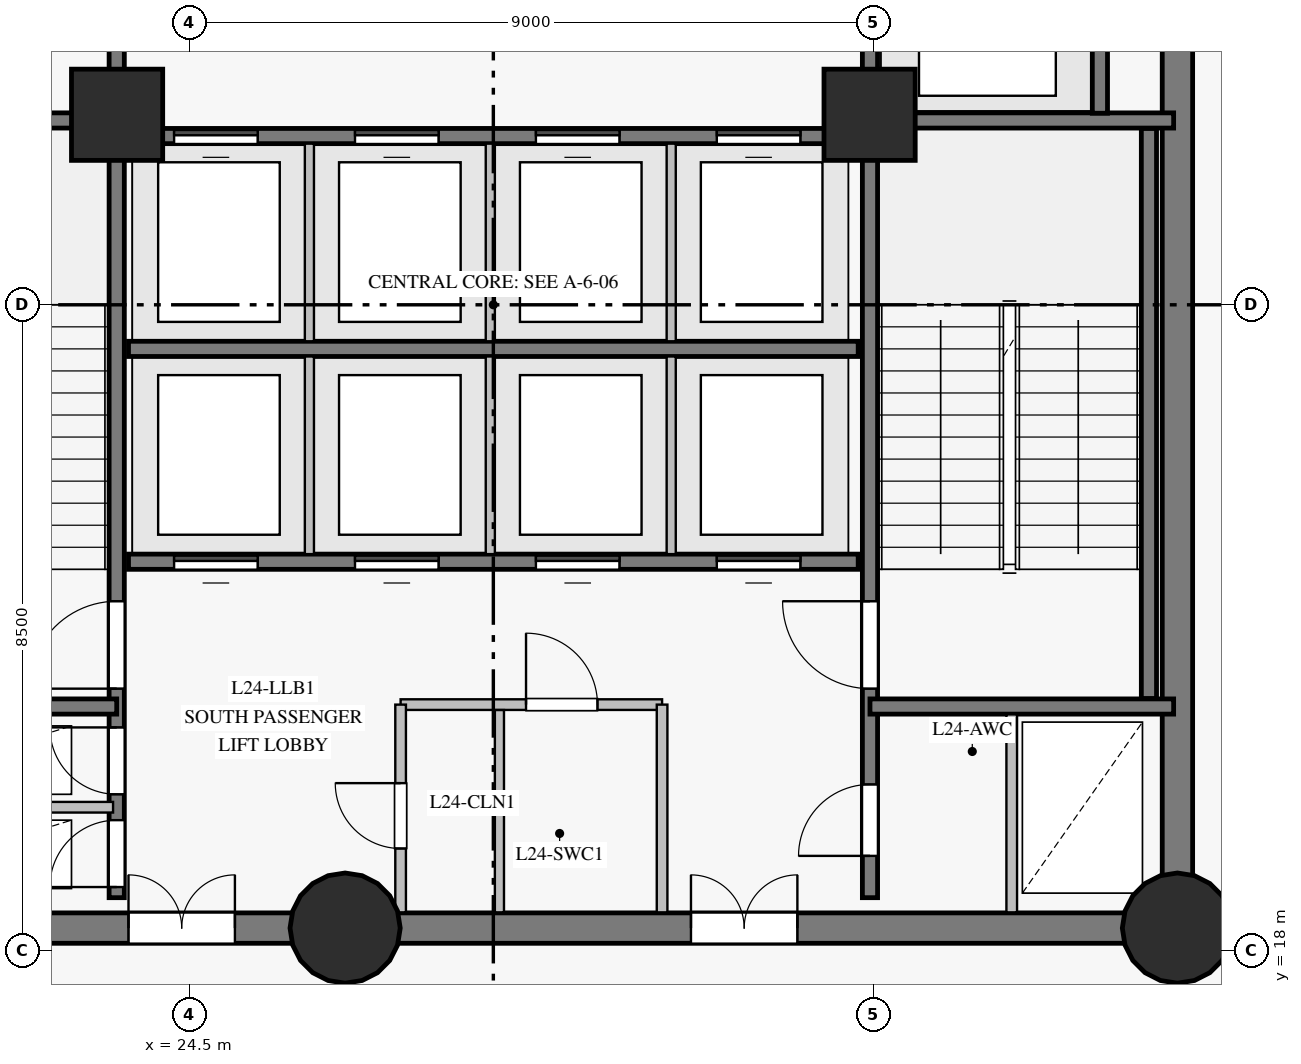
"""IFC4 building model, lengths in metres.
Left out: names, types, materials, properties, quantities, classifications, styles, units other than length and angle.
Written with IfcOpenShell. Run it as: python <this file> out.ifc"""

import sys

from ifc_helpers import new_model, si_unit, direction, frame, frame_2d, origin, origin_with_axes, origin_2d, place, context, subcontext, project, spatial, rectangle, circle, extrude, source, transform, mapped, element, fill, save


model = new_model("IFC4")
c1 = context("Model", 3, precision=1e-05, world=origin(), true_north=direction((0.0, 1.0)))
c2 = subcontext(c1, "Body", "Model", "MODEL_VIEW")
j1 = project(units=[si_unit("LENGTHUNIT", "METRE"), si_unit("PLANEANGLEUNIT", "RADIAN")], contexts=[c1])
p1 = place(None, origin())
s1 = spatial("IfcSite", under=j1, at=p1, CompositionType="ELEMENT")
p2 = place(p1, origin())
s2 = spatial("IfcBuilding", under=s1, at=p2, CompositionType="ELEMENT")
p3 = place(p2, frame((0.0, 0.0, 92.2)))
s3 = spatial("IfcBuildingStorey", under=s2, at=p3, CompositionType="ELEMENT", Elevation=92.2)
p4 = place(p3, frame((19.5, 18.3, 0.0), z_axis=(0.0, 0.0, 1.0), x_axis=(1.0, 0.0, 0.0)))
e1 = element("IfcWall", 1, at=p4, inside=s3, PredefinedType="SHEAR", context=c2, shape_type="SweptSolid", body=[
    extrude(rectangle(XDim=7.05, YDim=0.4, at=frame_2d((3.525, 0.0))), origin(), (0.0, 0.0, 1.0), 3.775),
])
p5 = place(p4, frame((4.2, 0.0, 0.0)))
e2 = element("IfcOpeningElement", 2, at=p5, cuts=e1, PredefinedType="OPENING", context=c2, shape_type="SweptSolid", body=[
    extrude(rectangle(XDim=1.4, YDim=2.2, at=frame_2d((0.7, 1.1))), frame((0.0, 0.21, 0.0), z_axis=(0.0, -1.0, 0.0), x_axis=(1.0, 0.0, 0.0)), (0.0, 0.0, 1.0), 0.42),
])
p6 = place(p3, frame((26.55, 18.3, 0.0), z_axis=(0.0, 0.0, 1.0), x_axis=(1.0, 0.0, 0.0)))
e3 = element("IfcWall", 3, at=p6, inside=s3, PredefinedType="SHEAR", context=c2, shape_type="SweptSolid", body=[
    extrude(rectangle(XDim=10.95, YDim=0.4, at=frame_2d((5.475, 0.0))), origin(), (0.0, 0.0, 1.0), 3.775),
])
p7 = place(p6, frame((4.55, 0.0, 0.0)))
e4 = element("IfcOpeningElement", 4, at=p7, cuts=e3, PredefinedType="OPENING", context=c2, shape_type="SweptSolid", body=[
    extrude(rectangle(XDim=1.4, YDim=2.2, at=frame_2d((0.7, 1.1))), frame((0.0, 0.21, 0.0), z_axis=(0.0, -1.0, 0.0), x_axis=(1.0, 0.0, 0.0)), (0.0, 0.0, 1.0), 0.42),
])
p8 = place(p3, frame((37.5, 18.3, 0.0), z_axis=(0.0, 0.0, 1.0), x_axis=(0.0, 1.0, 0.0)))
e5 = element("IfcWall", 5, at=p8, inside=s3, PredefinedType="SHEAR", context=c2, shape_type="SweptSolid", body=[
    extrude(rectangle(XDim=16.4, YDim=0.4, at=frame_2d((8.2, 0.0))), origin(), (0.0, 0.0, 1.0), 3.775),
])
p9 = place(p8, frame((14.15, 0.0, 0.0)))
e6 = element("IfcOpeningElement", 6, at=p9, cuts=e5, PredefinedType="OPENING", context=c2, shape_type="SweptSolid", body=[
    extrude(rectangle(XDim=1.2, YDim=2.15, at=frame_2d((0.6, 1.075))), frame((0.0, 0.21, 0.0), z_axis=(0.0, -1.0, 0.0), x_axis=(1.0, 0.0, 0.0)), (0.0, 0.0, 1.0), 0.42),
])
m1 = source(origin_with_axes(), c2, "Body", "SweptSolid", [
    extrude(circle(Radius=0.725, at=origin_2d()), origin(), (0.0, 0.0, 1.0), 4.0),
])
for number, where, z_axis, x_axis in (
    (7, (26.55, 18.3, 0.0), (0.0, 0.0, 1.0), (1.0, 0.0, 0.0)),
    (8, (37.5, 18.3, 0.0), (0.0, 0.0, 1.0), (1.0, 0.0, 0.0)),
):
    element("IfcColumn", number, at=place(p3, frame(where, z_axis=z_axis, x_axis=x_axis)), inside=s3, PredefinedType="COLUMN", context=c2, shape_type="MappedRepresentation", body=[
        mapped(m1, transform((0.0, 0.0, 0.0), scale=1.0)),
    ])
m2 = source(origin_with_axes(), c2, "Body", "SweptSolid", [
    extrude(rectangle(XDim=1.2, YDim=1.2, at=origin_2d()), origin(), (0.0, 0.0, 1.0), 4.0),
])
for number, where, z_axis, x_axis in (
    (9, (23.55, 29.0, 0.0), (0.0, 0.0, 1.0), (1.0, 0.0, 0.0)),
    (10, (33.45, 29.0, 0.0), (0.0, 0.0, 1.0), (1.0, 0.0, 0.0)),
):
    element("IfcColumn", number, at=place(p3, frame(where, z_axis=z_axis, x_axis=x_axis)), inside=s3, PredefinedType="COLUMN", context=c2, shape_type="MappedRepresentation", body=[
        mapped(m2, transform((0.0, 0.0, 0.0), scale=1.0)),
    ])
p10 = place(p3, frame((23.545, 18.7, 0.0), z_axis=(0.0, 0.0, 1.0), x_axis=(0.0, 1.0, 0.0)))
e11 = element("IfcWall", 11, at=p10, inside=s3, PredefinedType="SHEAR", context=c2, shape_type="SweptSolid", body=[
    extrude(rectangle(XDim=15.6, YDim=0.2, at=frame_2d((7.8, 0.0))), origin(), (0.0, 0.0, 1.0), 3.775),
])
p11 = place(p10, frame((2.75, 0.0, 0.0)))
e12 = element("IfcOpeningElement", 12, at=p11, cuts=e11, PredefinedType="OPENING", context=c2, shape_type="SweptSolid", body=[
    extrude(rectangle(XDim=1.15, YDim=2.15, at=frame_2d((0.575, 1.075))), frame((0.0, 0.11, 0.0), z_axis=(0.0, -1.0, 0.0), x_axis=(1.0, 0.0, 0.0)), (0.0, 0.0, 1.0), 0.22),
])
p12 = place(p10, frame((0.14, 0.0, 0.0)))
e13 = element("IfcOpeningElement", 13, at=p12, cuts=e11, PredefinedType="OPENING", context=c2, shape_type="SweptSolid", body=[
    extrude(rectangle(XDim=0.88, YDim=2.1, at=frame_2d((0.44, 1.05))), frame((0.0, 0.11, 0.0), z_axis=(0.0, -1.0, 0.0), x_axis=(1.0, 0.0, 0.0)), (0.0, 0.0, 1.0), 0.22),
])
p13 = place(p10, frame((1.36, 0.0, 0.0)))
e14 = element("IfcOpeningElement", 14, at=p13, cuts=e11, PredefinedType="OPENING", context=c2, shape_type="SweptSolid", body=[
    extrude(rectangle(XDim=0.88, YDim=2.1, at=frame_2d((0.44, 1.05))), frame((0.0, 0.11, 0.0), z_axis=(0.0, -1.0, 0.0), x_axis=(1.0, 0.0, 0.0)), (0.0, 0.0, 1.0), 0.22),
])
p14 = place(p10, frame((12.1, 0.0, 0.0)))
e15 = element("IfcOpeningElement", 15, at=p14, cuts=e11, PredefinedType="OPENING", context=c2, shape_type="SweptSolid", body=[
    extrude(rectangle(XDim=1.12, YDim=2.15, at=frame_2d((0.56, 1.075))), frame((0.0, 0.11, 0.0), z_axis=(0.0, -1.0, 0.0), x_axis=(1.0, 0.0, 0.0)), (0.0, 0.0, 1.0), 0.22),
])
p15 = place(p10, frame((14.05, 0.0, 0.0)))
e16 = element("IfcOpeningElement", 16, at=p15, cuts=e11, PredefinedType="OPENING", context=c2, shape_type="SweptSolid", body=[
    extrude(rectangle(XDim=1.12, YDim=2.15, at=frame_2d((0.56, 1.075))), frame((0.0, 0.11, 0.0), z_axis=(0.0, -1.0, 0.0), x_axis=(1.0, 0.0, 0.0)), (0.0, 0.0, 1.0), 0.22),
])
p16 = place(p3, frame((33.455, 18.7, 0.0), z_axis=(0.0, 0.0, 1.0), x_axis=(0.0, 1.0, 0.0)))
e17 = element("IfcWall", 17, at=p16, inside=s3, PredefinedType="SHEAR", context=c2, shape_type="SweptSolid", body=[
    extrude(rectangle(XDim=15.6, YDim=0.2, at=frame_2d((7.8, 0.0))), origin(), (0.0, 0.0, 1.0), 3.775),
])
p17 = place(p16, frame((2.75, 0.0, 0.0)))
e18 = element("IfcOpeningElement", 18, at=p17, cuts=e17, PredefinedType="OPENING", context=c2, shape_type="SweptSolid", body=[
    extrude(rectangle(XDim=1.15, YDim=2.15, at=frame_2d((0.575, 1.075))), frame((0.0, 0.11, 0.0), z_axis=(0.0, -1.0, 0.0), x_axis=(1.0, 0.0, 0.0)), (0.0, 0.0, 1.0), 0.22),
])
p18 = place(p16, frame((0.55, 0.0, 0.0)))
e19 = element("IfcOpeningElement", 19, at=p18, cuts=e17, PredefinedType="OPENING", context=c2, shape_type="SweptSolid", body=[
    extrude(rectangle(XDim=0.94, YDim=2.1, at=frame_2d((0.47, 1.05))), frame((0.0, 0.11, 0.0), z_axis=(0.0, -1.0, 0.0), x_axis=(1.0, 0.0, 0.0)), (0.0, 0.0, 1.0), 0.22),
])
p19 = place(p3, frame((23.7, 23.12, 0.0), z_axis=(0.0, 0.0, 1.0), x_axis=(1.0, 0.0, 0.0)))
e20 = element("IfcWall", 20, at=p19, inside=s3, PredefinedType="SHEAR", context=c2, shape_type="SweptSolid", body=[
    extrude(rectangle(XDim=9.6, YDim=0.2, at=frame_2d((4.8, 0.0))), origin(), (0.0, 0.0, 1.0), 3.775),
])
p20 = place(p19, frame((0.6, 0.0, 0.0)))
e21 = element("IfcOpeningElement", 21, at=p20, cuts=e20, PredefinedType="OPENING", context=c2, shape_type="SweptSolid", body=[
    extrude(rectangle(XDim=1.1, YDim=2.15, at=frame_2d((0.55, 1.075))), frame((0.0, 0.11, 0.0), z_axis=(0.0, -1.0, 0.0), x_axis=(1.0, 0.0, 0.0)), (0.0, 0.0, 1.0), 0.22),
])
p21 = place(p19, frame((2.98, 0.0, 0.0)))
e22 = element("IfcOpeningElement", 22, at=p21, cuts=e20, PredefinedType="OPENING", context=c2, shape_type="SweptSolid", body=[
    extrude(rectangle(XDim=1.1, YDim=2.15, at=frame_2d((0.55, 1.075))), frame((0.0, 0.11, 0.0), z_axis=(0.0, -1.0, 0.0), x_axis=(1.0, 0.0, 0.0)), (0.0, 0.0, 1.0), 0.22),
])
p22 = place(p19, frame((5.36, 0.0, 0.0)))
e23 = element("IfcOpeningElement", 23, at=p22, cuts=e20, PredefinedType="OPENING", context=c2, shape_type="SweptSolid", body=[
    extrude(rectangle(XDim=1.1, YDim=2.15, at=frame_2d((0.55, 1.075))), frame((0.0, 0.11, 0.0), z_axis=(0.0, -1.0, 0.0), x_axis=(1.0, 0.0, 0.0)), (0.0, 0.0, 1.0), 0.22),
])
p23 = place(p19, frame((7.74, 0.0, 0.0)))
e24 = element("IfcOpeningElement", 24, at=p23, cuts=e20, PredefinedType="OPENING", context=c2, shape_type="SweptSolid", body=[
    extrude(rectangle(XDim=1.1, YDim=2.15, at=frame_2d((0.55, 1.075))), frame((0.0, 0.11, 0.0), z_axis=(0.0, -1.0, 0.0), x_axis=(1.0, 0.0, 0.0)), (0.0, 0.0, 1.0), 0.22),
])
p24 = place(p3, frame((23.7, 25.92, 0.0), z_axis=(0.0, 0.0, 1.0), x_axis=(1.0, 0.0, 0.0)))
e25 = element("IfcWall", 25, at=p24, inside=s3, PredefinedType="SHEAR", context=c2, shape_type="SweptSolid", body=[
    extrude(rectangle(XDim=9.6, YDim=0.2, at=frame_2d((4.8, 0.0))), origin(), (0.0, 0.0, 1.0), 3.775),
])
p25 = place(p3, frame((23.7, 28.72, 0.0), z_axis=(0.0, 0.0, 1.0), x_axis=(1.0, 0.0, 0.0)))
e26 = element("IfcWall", 26, at=p25, inside=s3, PredefinedType="SHEAR", context=c2, shape_type="SweptSolid", body=[
    extrude(rectangle(XDim=9.6, YDim=0.2, at=frame_2d((4.8, 0.0))), origin(), (0.0, 0.0, 1.0), 3.775),
])
p26 = place(p25, frame((0.6, 0.0, 0.0)))
e27 = element("IfcOpeningElement", 27, at=p26, cuts=e26, PredefinedType="OPENING", context=c2, shape_type="SweptSolid", body=[
    extrude(rectangle(XDim=1.1, YDim=2.15, at=frame_2d((0.55, 1.075))), frame((0.0, 0.11, 0.0), z_axis=(0.0, -1.0, 0.0), x_axis=(1.0, 0.0, 0.0)), (0.0, 0.0, 1.0), 0.22),
])
p27 = place(p25, frame((2.98, 0.0, 0.0)))
e28 = element("IfcOpeningElement", 28, at=p27, cuts=e26, PredefinedType="OPENING", context=c2, shape_type="SweptSolid", body=[
    extrude(rectangle(XDim=1.1, YDim=2.15, at=frame_2d((0.55, 1.075))), frame((0.0, 0.11, 0.0), z_axis=(0.0, -1.0, 0.0), x_axis=(1.0, 0.0, 0.0)), (0.0, 0.0, 1.0), 0.22),
])
p28 = place(p25, frame((5.36, 0.0, 0.0)))
e29 = element("IfcOpeningElement", 29, at=p28, cuts=e26, PredefinedType="OPENING", context=c2, shape_type="SweptSolid", body=[
    extrude(rectangle(XDim=1.1, YDim=2.15, at=frame_2d((0.55, 1.075))), frame((0.0, 0.11, 0.0), z_axis=(0.0, -1.0, 0.0), x_axis=(1.0, 0.0, 0.0)), (0.0, 0.0, 1.0), 0.22),
])
p29 = place(p25, frame((7.74, 0.0, 0.0)))
e30 = element("IfcOpeningElement", 30, at=p29, cuts=e26, PredefinedType="OPENING", context=c2, shape_type="SweptSolid", body=[
    extrude(rectangle(XDim=1.1, YDim=2.15, at=frame_2d((0.55, 1.075))), frame((0.0, 0.11, 0.0), z_axis=(0.0, -1.0, 0.0), x_axis=(1.0, 0.0, 0.0)), (0.0, 0.0, 1.0), 0.22),
])
p30 = place(p3, frame((37.125, 21.32, 0.0), z_axis=(0.0, 0.0, 1.0), x_axis=(0.0, 1.0, 0.0)))
e31 = element("IfcWall", 31, at=p30, inside=s3, PredefinedType="SHEAR", context=c2, shape_type="SweptSolid", body=[
    extrude(rectangle(XDim=7.5, YDim=0.2, at=frame_2d((3.75, 0.0))), origin(), (0.0, 0.0, 1.0), 3.775),
])
for number, where, z_axis, x_axis in (
    (32, (33.455, 21.215, 0.0), (0.0, 0.0, 1.0), (1.0, 0.0, 0.0)),
    (33, (33.455, 28.925, 0.0), (0.0, 0.0, 1.0), (1.0, 0.0, 0.0)),
    (34, (19.55, 21.215, 0.0), (0.0, 0.0, 1.0), (1.0, 0.0, 0.0)),
    (35, (19.55, 28.925, 0.0), (0.0, 0.0, 1.0), (1.0, 0.0, 0.0)),
):
    element("IfcWall", number, at=place(p3, frame(where, z_axis=z_axis, x_axis=x_axis)), inside=s3, PredefinedType="SHEAR", context=c2, shape_type="SweptSolid", body=[
        extrude(rectangle(XDim=3.995, YDim=0.2, at=frame_2d((1.998, 0.0))), origin(), (0.0, 0.0, 1.0), 3.775),
    ])
p31 = place(p3, frame((36.48, 29.02, 0.0), z_axis=(0.0, 0.0, 1.0), x_axis=(0.0, 1.0, 0.0)))
e36 = element("IfcWall", 36, at=p31, inside=s3, PredefinedType="SHEAR", context=c2, shape_type="SweptSolid", body=[
    extrude(rectangle(XDim=2.86, YDim=0.2, at=frame_2d((1.43, 0.0))), origin(), (0.0, 0.0, 1.0), 3.775),
])
p32 = place(p3, frame((19.707, 19.89, 0.0), z_axis=(0.0, 0.0, 1.0), x_axis=(1.0, 0.0, 0.0)))
e37 = element("IfcWall", 37, at=p32, inside=s3, PredefinedType="PARTITIONING", context=c2, shape_type="SweptSolid", body=[
    extrude(rectangle(XDim=3.79, YDim=0.14, at=frame_2d((1.895, 0.0))), origin(), (0.0, 0.0, 1.0), 3.775),
])
p33 = place(p3, frame((27.28, 21.24, 0.0), z_axis=(0.0, 0.0, 1.0), x_axis=(1.0, 0.0, 0.0)))
e38 = element("IfcWall", 38, at=p33, inside=s3, PredefinedType="PARTITIONING", context=c2, shape_type="SweptSolid", body=[
    extrude(rectangle(XDim=3.44, YDim=0.14, at=frame_2d((1.72, 0.0))), origin(), (0.0, 0.0, 1.0), 3.775),
])
p34 = place(p33, frame((1.65, 0.0, 0.0)))
e39 = element("IfcOpeningElement", 39, at=p34, cuts=e38, PredefinedType="OPENING", context=c2, shape_type="SweptSolid", body=[
    extrude(rectangle(XDim=0.94, YDim=2.1, at=frame_2d((0.47, 1.05))), frame((0.0, 0.08, 0.0), z_axis=(0.0, -1.0, 0.0), x_axis=(1.0, 0.0, 0.0)), (0.0, 0.0, 1.0), 0.16),
])
p35 = place(p3, frame((27.28, 18.507, 0.0), z_axis=(0.0, 0.0, 1.0), x_axis=(0.0, 1.0, 0.0)))
e40 = element("IfcWall", 40, at=p35, inside=s3, PredefinedType="PARTITIONING", context=c2, shape_type="SweptSolid", body=[
    extrude(rectangle(XDim=2.733, YDim=0.14, at=frame_2d((1.366, 0.0))), origin(), (0.0, 0.0, 1.0), 3.775),
])
p36 = place(p35, frame((0.84, 0.0, 0.0)))
e41 = element("IfcOpeningElement", 41, at=p36, cuts=e40, PredefinedType="OPENING", context=c2, shape_type="SweptSolid", body=[
    extrude(rectangle(XDim=0.86, YDim=2.1, at=frame_2d((0.43, 1.05))), frame((0.0, 0.08, 0.0), z_axis=(0.0, -1.0, 0.0), x_axis=(1.0, 0.0, 0.0)), (0.0, 0.0, 1.0), 0.16),
])
p37 = place(p3, frame((30.72, 18.507, 0.0), z_axis=(0.0, 0.0, 1.0), x_axis=(0.0, 1.0, 0.0)))
e42 = element("IfcWall", 42, at=p37, inside=s3, PredefinedType="PARTITIONING", context=c2, shape_type="SweptSolid", body=[
    extrude(rectangle(XDim=2.733, YDim=0.14, at=frame_2d((1.366, 0.0))), origin(), (0.0, 0.0, 1.0), 3.775),
])
for number, where, z_axis, x_axis in (
    (43, (26.08, 23.22, 0.0), (0.0, 0.0, 1.0), (0.0, 1.0, 0.0)),
    (44, (28.46, 23.22, 0.0), (0.0, 0.0, 1.0), (0.0, 1.0, 0.0)),
    (45, (30.84, 23.22, 0.0), (0.0, 0.0, 1.0), (0.0, 1.0, 0.0)),
    (46, (26.08, 26.02, 0.0), (0.0, 0.0, 1.0), (0.0, 1.0, 0.0)),
    (47, (28.46, 26.02, 0.0), (0.0, 0.0, 1.0), (0.0, 1.0, 0.0)),
    (48, (30.84, 26.02, 0.0), (0.0, 0.0, 1.0), (0.0, 1.0, 0.0)),
):
    element("IfcWall", number, at=place(p3, frame(where, z_axis=z_axis, x_axis=x_axis)), inside=s3, PredefinedType="PARTITIONING", context=c2, shape_type="SweptSolid", body=[
        extrude(rectangle(XDim=2.6, YDim=0.12, at=frame_2d((1.3, 0.0))), origin(), (0.0, 0.0, 1.0), 3.775),
    ])
p38 = place(p3, frame((28.58, 18.507, 0.0), z_axis=(0.0, 0.0, 1.0), x_axis=(0.0, 1.0, 0.0)))
e49 = element("IfcWall", 49, at=p38, inside=s3, PredefinedType="PARTITIONING", context=c2, shape_type="SweptSolid", body=[
    extrude(rectangle(XDim=2.662, YDim=0.12, at=frame_2d((1.331, 0.0))), origin(), (0.0, 0.0, 1.0), 3.775),
])
p39 = place(p3, frame((35.32, 18.507, 0.0), z_axis=(0.0, 0.0, 1.0), x_axis=(0.0, 1.0, 0.0)))
e50 = element("IfcWall", 50, at=p39, inside=s3, PredefinedType="PARTITIONING", context=c2, shape_type="SweptSolid", body=[
    extrude(rectangle(XDim=2.604, YDim=0.14, at=frame_2d((1.302, 0.0))), origin(), (0.0, 0.0, 1.0), 3.775),
])
m3 = source(origin_with_axes(), c2, "Body", "SweptSolid", [
    extrude(rectangle(XDim=1.15, YDim=2.15, at=frame_2d((0.575, 1.075))), frame((0.0, 0.025, 0.0), z_axis=(0.0, -1.0, 0.0), x_axis=(1.0, 0.0, 0.0)), (0.0, 0.0, 1.0), 0.05),
])
p40 = place(p11, origin())
e51 = element("IfcDoor", 51, at=p40, inside=s3, OperationType="SINGLE_SWING_LEFT", PredefinedType="DOOR", context=c2, shape_type="MappedRepresentation", body=[
    mapped(m3, transform((0.0, 0.0, 0.0), scale=1.0)),
])
fill(e12, e51)
p41 = place(p17, origin())
e52 = element("IfcDoor", 52, at=p41, inside=s3, OperationType="SINGLE_SWING_RIGHT", PredefinedType="DOOR", context=c2, shape_type="MappedRepresentation", body=[
    mapped(m3, transform((0.0, 0.0, 0.0), scale=1.0)),
])
fill(e18, e52)
m4 = source(origin_with_axes(), c2, "Body", "SweptSolid", [
    extrude(rectangle(XDim=0.88, YDim=2.1, at=frame_2d((0.44, 1.05))), frame((0.0, 0.025, 0.0), z_axis=(0.0, -1.0, 0.0), x_axis=(1.0, 0.0, 0.0)), (0.0, 0.0, 1.0), 0.05),
])
p42 = place(p12, origin())
e53 = element("IfcDoor", 53, at=p42, inside=s3, OperationType="SINGLE_SWING_LEFT", PredefinedType="DOOR", context=c2, shape_type="MappedRepresentation", body=[
    mapped(m4, transform((0.0, 0.0, 0.0), scale=1.0)),
])
fill(e13, e53)
p43 = place(p13, origin())
e54 = element("IfcDoor", 54, at=p43, inside=s3, OperationType="SINGLE_SWING_RIGHT", PredefinedType="DOOR", context=c2, shape_type="MappedRepresentation", body=[
    mapped(m4, transform((0.0, 0.0, 0.0), scale=1.0)),
])
fill(e14, e54)
m5 = source(origin_with_axes(), c2, "Body", "SweptSolid", [
    extrude(rectangle(XDim=1.4, YDim=2.2, at=frame_2d((0.7, 1.1))), frame((0.0, 0.025, 0.0), z_axis=(0.0, -1.0, 0.0), x_axis=(1.0, 0.0, 0.0)), (0.0, 0.0, 1.0), 0.05),
])
p44 = place(p5, origin())
e55 = element("IfcDoor", 55, at=p44, inside=s3, OperationType="DOUBLE_DOOR_SINGLE_SWING", PredefinedType="DOOR", context=c2, shape_type="MappedRepresentation", body=[
    mapped(m5, transform((0.0, 0.0, 0.0), scale=1.0)),
])
fill(e2, e55)
p45 = place(p7, origin())
e56 = element("IfcDoor", 56, at=p45, inside=s3, OperationType="DOUBLE_DOOR_SINGLE_SWING", PredefinedType="DOOR", context=c2, shape_type="MappedRepresentation", body=[
    mapped(m5, transform((0.0, 0.0, 0.0), scale=1.0)),
])
fill(e4, e56)
m6 = source(origin_with_axes(), c2, "Body", "SweptSolid", [
    extrude(rectangle(XDim=0.94, YDim=2.1, at=frame_2d((0.47, 1.05))), frame((0.0, 0.025, 0.0), z_axis=(0.0, -1.0, 0.0), x_axis=(1.0, 0.0, 0.0)), (0.0, 0.0, 1.0), 0.05),
])
p46 = place(p18, origin())
e57 = element("IfcDoor", 57, at=p46, inside=s3, OperationType="SINGLE_SWING_LEFT", PredefinedType="DOOR", context=c2, shape_type="MappedRepresentation", body=[
    mapped(m6, transform((0.0, 0.0, 0.0), scale=1.0)),
])
fill(e19, e57)
m7 = source(origin_with_axes(), c2, "Body", "SweptSolid", [
    extrude(rectangle(XDim=0.86, YDim=2.1, at=frame_2d((0.43, 1.05))), frame((0.0, 0.025, 0.0), z_axis=(0.0, -1.0, 0.0), x_axis=(1.0, 0.0, 0.0)), (0.0, 0.0, 1.0), 0.05),
])
p47 = place(p36, origin())
e58 = element("IfcDoor", 58, at=p47, inside=s3, OperationType="SINGLE_SWING_RIGHT", PredefinedType="DOOR", context=c2, shape_type="MappedRepresentation", body=[
    mapped(m7, transform((0.0, 0.0, 0.0), scale=1.0)),
])
fill(e41, e58)
p48 = place(p34, origin())
e59 = element("IfcDoor", 59, at=p48, inside=s3, OperationType="SINGLE_SWING_LEFT", PredefinedType="DOOR", context=c2, shape_type="MappedRepresentation", body=[
    mapped(m6, transform((0.0, 0.0, 0.0), scale=1.0)),
])
fill(e39, e59)
m8 = source(origin_with_axes(), c2, "Body", "SweptSolid", [
    extrude(rectangle(XDim=1.1, YDim=2.15, at=frame_2d((0.55, 1.075))), frame((0.0, 0.025, 0.0), z_axis=(0.0, -1.0, 0.0), x_axis=(1.0, 0.0, 0.0)), (0.0, 0.0, 1.0), 0.05),
])
p49 = place(p20, origin())
e60 = element("IfcDoor", 60, at=p49, inside=s3, OperationType="SLIDING_TO_LEFT", PredefinedType="DOOR", context=c2, shape_type="MappedRepresentation", body=[
    mapped(m8, transform((0.0, 0.0, 0.0), scale=1.0)),
])
fill(e21, e60)
p50 = place(p21, origin())
e61 = element("IfcDoor", 61, at=p50, inside=s3, OperationType="SLIDING_TO_RIGHT", PredefinedType="DOOR", context=c2, shape_type="MappedRepresentation", body=[
    mapped(m8, transform((0.0, 0.0, 0.0), scale=1.0)),
])
fill(e22, e61)
p51 = place(p22, origin())
e62 = element("IfcDoor", 62, at=p51, inside=s3, OperationType="SLIDING_TO_LEFT", PredefinedType="DOOR", context=c2, shape_type="MappedRepresentation", body=[
    mapped(m8, transform((0.0, 0.0, 0.0), scale=1.0)),
])
fill(e23, e62)
p52 = place(p23, origin())
e63 = element("IfcDoor", 63, at=p52, inside=s3, OperationType="SLIDING_TO_RIGHT", PredefinedType="DOOR", context=c2, shape_type="MappedRepresentation", body=[
    mapped(m8, transform((0.0, 0.0, 0.0), scale=1.0)),
])
fill(e24, e63)
p53 = place(p26, origin())
e64 = element("IfcDoor", 64, at=p53, inside=s3, OperationType="SLIDING_TO_LEFT", PredefinedType="DOOR", context=c2, shape_type="MappedRepresentation", body=[
    mapped(m8, transform((0.0, 0.0, 0.0), scale=1.0)),
])
fill(e27, e64)
p54 = place(p27, origin())
e65 = element("IfcDoor", 65, at=p54, inside=s3, OperationType="SLIDING_TO_RIGHT", PredefinedType="DOOR", context=c2, shape_type="MappedRepresentation", body=[
    mapped(m8, transform((0.0, 0.0, 0.0), scale=1.0)),
])
fill(e28, e65)
p55 = place(p28, origin())
e66 = element("IfcDoor", 66, at=p55, inside=s3, OperationType="SLIDING_TO_LEFT", PredefinedType="DOOR", context=c2, shape_type="MappedRepresentation", body=[
    mapped(m8, transform((0.0, 0.0, 0.0), scale=1.0)),
])
fill(e29, e66)
p56 = place(p29, origin())
e67 = element("IfcDoor", 67, at=p56, inside=s3, OperationType="SLIDING_TO_RIGHT", PredefinedType="DOOR", context=c2, shape_type="MappedRepresentation", body=[
    mapped(m8, transform((0.0, 0.0, 0.0), scale=1.0)),
])
fill(e30, e67)
save(model, sys.argv[1])
